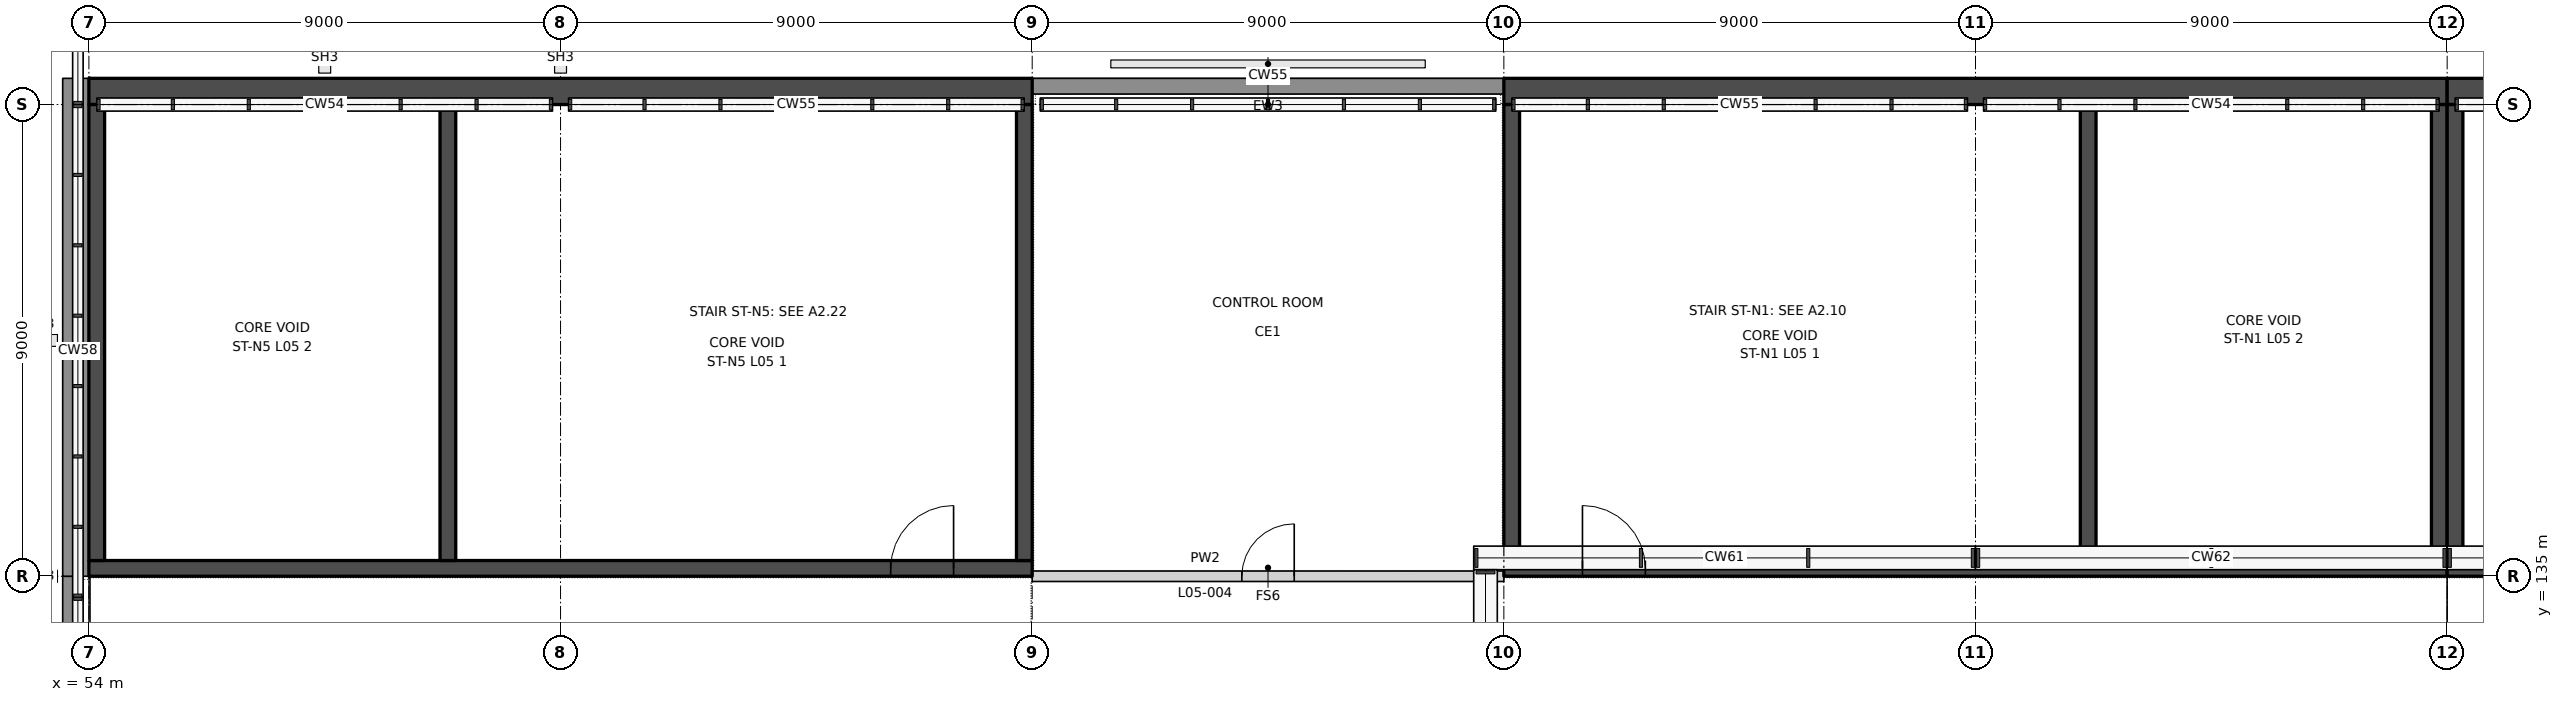
"""IFC4 building model, lengths in metres.
Left out: names, types, materials, properties, quantities, classifications, styles, units other than length and angle.
Written with IfcOpenShell. Run it as: python <this file> out.ifc"""

import sys

from ifc_helpers import new_model, si_unit, direction, frame, frame_2d, origin, place, context, subcontext, project, spatial, rectangle, extrude, element, fill, save


model = new_model("IFC4")
c1 = context("Model", 3, precision=1e-05, world=origin(), true_north=direction((0.0, 1.0)))
c2 = subcontext(c1, "Body", "Model", "MODEL_VIEW")
j1 = project(units=[si_unit("LENGTHUNIT", "METRE"), si_unit("PLANEANGLEUNIT", "RADIAN")], contexts=[c1])
p1 = place(None, origin())
s1 = spatial("IfcSite", under=j1, at=p1, CompositionType="ELEMENT")
p2 = place(p1, origin())
s2 = spatial("IfcBuilding", under=s1, at=p2, CompositionType="ELEMENT")
p3 = place(p2, frame((0.0, 0.0, 33.5)))
s3 = spatial("IfcBuildingStorey", under=s2, at=p3, CompositionType="ELEMENT", Elevation=33.5)
p4 = place(p3, frame((72.0, 135.0, 0.0), z_axis=(0.0, 0.0, 1.0), x_axis=(1.0, 0.0, 0.0)))
e1 = element("IfcWall", 1, at=p4, inside=s3, PredefinedType="PARTITIONING", context=c2, shape_type="SweptSolid", body=[
    extrude(rectangle(XDim=9.0, YDim=0.2, at=frame_2d((4.5, 0.0))), origin(), (0.0, 0.0, 1.0), 4.0),
])
p5 = place(p4, frame((4.0, 0.0, 0.0)))
e2 = element("IfcOpeningElement", 2, at=p5, cuts=e1, PredefinedType="OPENING", context=c2, shape_type="SweptSolid", body=[
    extrude(rectangle(XDim=1.0, YDim=2.1, at=frame_2d((0.5, 1.05))), frame((0.0, 0.11, 0.0), z_axis=(0.0, -1.0, 0.0), x_axis=(1.0, 0.0, 0.0)), (0.0, 0.0, 1.0), 0.22),
])
p6 = place(p3, frame((81.0, 144.35, 0.0), z_axis=(0.0, 0.0, 1.0), x_axis=(-1.0, 0.0, 0.0)))
e3 = element("IfcWall", 3, at=p6, inside=s3, PredefinedType="SOLIDWALL", context=c2, shape_type="SweptSolid", body=[
    extrude(rectangle(XDim=9.0, YDim=0.3, at=frame_2d((4.5, 0.0))), origin(), (0.0, 0.0, 1.0), 4.0),
])
p7 = place(p3, frame((53.65, 135.0, 0.0), z_axis=(0.0, 0.0, 1.0), x_axis=(0.0, -1.0, 0.0)))
e4 = element("IfcWall", 4, at=p7, inside=s3, PredefinedType="SOLIDWALL", context=c2, shape_type="SweptSolid", body=[
    extrude(rectangle(XDim=8.6, YDim=0.3, at=frame_2d((4.3, 0.0))), origin(), (0.0, 0.0, 1.0), 4.0),
])
p8 = place(p3, frame((53.75, 144.5, 0.0), z_axis=(0.0, 0.0, 1.0), x_axis=(0.0, -1.0, 0.0)))
e5 = element("IfcWall", 5, at=p8, inside=s3, PredefinedType="SOLIDWALL", context=c2, shape_type="SweptSolid", body=[
    extrude(rectangle(XDim=9.5, YDim=0.5, at=frame_2d((4.75, 0.0))), origin(), (0.0, 0.0, 1.0), 4.0),
])
p9 = place(p3, frame((81.0, 135.15, 0.0), z_axis=(0.0, 0.0, 1.0), x_axis=(1.0, 0.0, 0.0)))
e6 = element("IfcWall", 6, at=p9, inside=s3, PredefinedType="SHEAR", context=c2, shape_type="SweptSolid", body=[
    extrude(rectangle(XDim=18.0, YDim=0.3, at=frame_2d((9.0, 0.0))), origin(), (0.0, 0.0, 1.0), 4.0),
])
p10 = place(p9, frame((1.5, 0.0, 0.0)))
e7 = element("IfcOpeningElement", 7, at=p10, cuts=e6, PredefinedType="OPENING", context=c2, shape_type="SweptSolid", body=[
    extrude(rectangle(XDim=1.2, YDim=2.1, at=frame_2d((0.6, 1.05))), frame((0.0, 0.16, 0.0), z_axis=(0.0, -1.0, 0.0), x_axis=(1.0, 0.0, 0.0)), (0.0, 0.0, 1.0), 0.32),
])
p11 = place(p3, frame((81.0, 144.25, 0.0), z_axis=(0.0, 0.0, 1.0), x_axis=(1.0, 0.0, 0.0)))
e8 = element("IfcWall", 8, at=p11, inside=s3, PredefinedType="SHEAR", context=c2, shape_type="SweptSolid", body=[
    extrude(rectangle(XDim=18.0, YDim=0.5, at=frame_2d((9.0, 0.0))), origin(), (0.0, 0.0, 1.0), 4.0),
])
for number, where, z_axis, x_axis in (
    (9, (81.15, 135.3, 0.0), (0.0, 0.0, 1.0), (0.0, 1.0, 0.0)),
    (10, (98.85, 135.3, 0.0), (0.0, 0.0, 1.0), (0.0, 1.0, 0.0)),
    (11, (92.15, 135.3, 0.0), (0.0, 0.0, 1.0), (0.0, 1.0, 0.0)),
):
    element("IfcWall", number, at=place(p3, frame(where, z_axis=z_axis, x_axis=x_axis)), inside=s3, PredefinedType="SHEAR", context=c2, shape_type="SweptSolid", body=[
        extrude(rectangle(XDim=8.7, YDim=0.3, at=frame_2d((4.35, 0.0))), origin(), (0.0, 0.0, 1.0), 4.0),
    ])
p12 = place(p3, frame((117.0, 135.15, 0.0), z_axis=(0.0, 0.0, 1.0), x_axis=(-1.0, 0.0, 0.0)))
e12 = element("IfcWall", 12, at=p12, inside=s3, PredefinedType="SHEAR", context=c2, shape_type="SweptSolid", body=[
    extrude(rectangle(XDim=18.0, YDim=0.3, at=frame_2d((9.0, 0.0))), origin(), (0.0, 0.0, 1.0), 4.0),
])
p13 = place(p12, frame((8.6, 0.0, 0.0)))
e13 = element("IfcOpeningElement", 13, at=p13, cuts=e12, PredefinedType="OPENING", context=c2, shape_type="SweptSolid", body=[
    extrude(rectangle(XDim=1.2, YDim=2.1, at=frame_2d((0.6, 1.05))), frame((0.0, 0.16, 0.0), z_axis=(0.0, -1.0, 0.0), x_axis=(1.0, 0.0, 0.0)), (0.0, 0.0, 1.0), 0.32),
])
p14 = place(p3, frame((117.0, 144.25, 0.0), z_axis=(0.0, 0.0, 1.0), x_axis=(-1.0, 0.0, 0.0)))
e14 = element("IfcWall", 14, at=p14, inside=s3, PredefinedType="SHEAR", context=c2, shape_type="SweptSolid", body=[
    extrude(rectangle(XDim=18.0, YDim=0.5, at=frame_2d((9.0, 0.0))), origin(), (0.0, 0.0, 1.0), 4.0),
])
p15 = place(p3, frame((99.15, 135.3, 0.0), z_axis=(0.0, 0.0, 1.0), x_axis=(0.0, 1.0, 0.0)))
e15 = element("IfcWall", 15, at=p15, inside=s3, PredefinedType="SHEAR", context=c2, shape_type="SweptSolid", body=[
    extrude(rectangle(XDim=8.7, YDim=0.3, at=frame_2d((4.35, 0.0))), origin(), (0.0, 0.0, 1.0), 4.0),
])
p16 = place(p3, frame((72.0, 135.15, 0.0), z_axis=(0.0, 0.0, 1.0), x_axis=(-1.0, 0.0, 0.0)))
e16 = element("IfcWall", 16, at=p16, inside=s3, PredefinedType="SHEAR", context=c2, shape_type="SweptSolid", body=[
    extrude(rectangle(XDim=18.0, YDim=0.3, at=frame_2d((9.0, 0.0))), origin(), (0.0, 0.0, 1.0), 4.0),
])
p17 = place(p16, frame((1.5, 0.0, 0.0)))
e17 = element("IfcOpeningElement", 17, at=p17, cuts=e16, PredefinedType="OPENING", context=c2, shape_type="SweptSolid", body=[
    extrude(rectangle(XDim=1.2, YDim=2.1, at=frame_2d((0.6, 1.05))), frame((0.0, 0.16, 0.0), z_axis=(0.0, -1.0, 0.0), x_axis=(1.0, 0.0, 0.0)), (0.0, 0.0, 1.0), 0.32),
])
p18 = place(p3, frame((72.0, 144.25, 0.0), z_axis=(0.0, 0.0, 1.0), x_axis=(-1.0, 0.0, 0.0)))
e18 = element("IfcWall", 18, at=p18, inside=s3, PredefinedType="SHEAR", context=c2, shape_type="SweptSolid", body=[
    extrude(rectangle(XDim=18.0, YDim=0.5, at=frame_2d((9.0, 0.0))), origin(), (0.0, 0.0, 1.0), 4.0),
])
for number, where, z_axis, x_axis in (
    (19, (71.85, 135.3, 0.0), (0.0, 0.0, 1.0), (0.0, 1.0, 0.0)),
    (20, (54.15, 135.3, 0.0), (0.0, 0.0, 1.0), (0.0, 1.0, 0.0)),
    (21, (60.85, 135.3, 0.0), (0.0, 0.0, 1.0), (0.0, 1.0, 0.0)),
):
    element("IfcWall", number, at=place(p3, frame(where, z_axis=z_axis, x_axis=x_axis)), inside=s3, PredefinedType="SHEAR", context=c2, shape_type="SweptSolid", body=[
        extrude(rectangle(XDim=8.7, YDim=0.3, at=frame_2d((4.35, 0.0))), origin(), (0.0, 0.0, 1.0), 4.0),
    ])
p19 = place(p5, origin())
e22 = element("IfcDoor", 22, at=p19, inside=s3, OperationType="SINGLE_SWING_RIGHT", PredefinedType="DOOR", context=c2, shape_type="SweptSolid", body=[
    extrude(rectangle(XDim=1.0, YDim=2.1, at=frame_2d((0.5, 1.05))), frame((0.0, 0.025, 0.0), z_axis=(0.0, -1.0, 0.0), x_axis=(1.0, 0.0, 0.0)), (0.0, 0.0, 1.0), 0.05),
])
fill(e2, e22)
p20 = place(p10, origin())
e23 = element("IfcDoor", 23, at=p20, inside=s3, OperationType="SINGLE_SWING_LEFT", PredefinedType="DOOR", context=c2, shape_type="SweptSolid", body=[
    extrude(rectangle(XDim=1.2, YDim=2.1, at=frame_2d((0.6, 1.05))), frame((0.0, 0.025, 0.0), z_axis=(0.0, -1.0, 0.0), x_axis=(1.0, 0.0, 0.0)), (0.0, 0.0, 1.0), 0.05),
])
fill(e7, e23)
p21 = place(p17, frame((1.2, 0.0, 0.0), z_axis=(0.0, 0.0, 1.0), x_axis=(-1.0, 0.0, 0.0)))
e24 = element("IfcDoor", 24, at=p21, inside=s3, OperationType="SINGLE_SWING_RIGHT", PredefinedType="DOOR", context=c2, shape_type="SweptSolid", body=[
    extrude(rectangle(XDim=1.2, YDim=2.1, at=frame_2d((0.6, 1.05))), frame((0.0, 0.025, 0.0), z_axis=(0.0, -1.0, 0.0), x_axis=(1.0, 0.0, 0.0)), (0.0, 0.0, 1.0), 0.05),
])
fill(e17, e24)
save(model, sys.argv[1])
